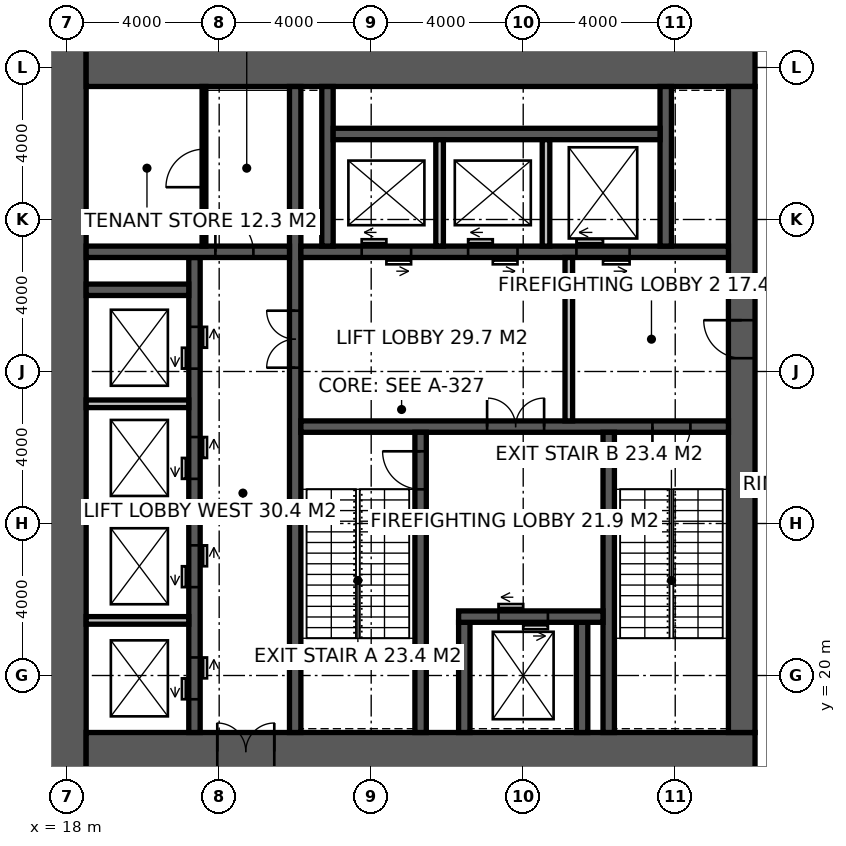
"""IFC4 building model, lengths in metres.
Left out: names, types, materials, properties, quantities, classifications, styles, units other than length and angle.
Written with IfcOpenShell. Run it as: python <this file> out.ifc"""

import sys

from ifc_helpers import new_model, si_unit, direction, frame, frame_2d, origin, place, context, subcontext, project, spatial, rectangle, extrude, element, fill, save


model = new_model("IFC4")
c1 = context("Model", 3, precision=1e-05, world=origin(), true_north=direction((0.0, 1.0)))
c2 = subcontext(c1, "Body", "Model", "MODEL_VIEW")
j1 = project(units=[si_unit("LENGTHUNIT", "METRE"), si_unit("PLANEANGLEUNIT", "RADIAN")], contexts=[c1])
p1 = place(None, origin())
s1 = spatial("IfcSite", under=j1, at=p1, CompositionType="ELEMENT")
p2 = place(p1, origin())
s2 = spatial("IfcBuilding", under=s1, at=p2, CompositionType="ELEMENT")
p3 = place(p2, frame((0.0, 0.0, 142.8)))
s3 = spatial("IfcBuildingStorey", under=s2, at=p3, CompositionType="ELEMENT", Elevation=142.8)
p4 = place(p3, frame((18.0, 17.5, -0.15), z_axis=(0.0, 0.0, 1.0), x_axis=(0.0, 1.0, 0.0)))
e1 = element("IfcWall", 1, at=p4, inside=s3, PredefinedType="SHEAR", context=c2, shape_type="SweptSolid", body=[
    extrude(rectangle(XDim=19.0, YDim=1.0, at=frame_2d((9.5, 0.0))), origin(), (0.0, 0.0, 1.0), 5.0),
])
p5 = place(p3, frame((18.5, 18.0, -0.15), z_axis=(0.0, 0.0, 1.0), x_axis=(1.0, 0.0, 0.0)))
e2 = element("IfcWall", 2, at=p5, inside=s3, PredefinedType="SHEAR", context=c2, shape_type="SweptSolid", body=[
    extrude(rectangle(XDim=17.6, YDim=1.0, at=frame_2d((8.8, 0.0))), origin(), (0.0, 0.0, 1.0), 5.0),
])
p6 = place(p5, frame((3.45, 0.0, 0.15)))
e3 = element("IfcOpeningElement", 3, at=p6, cuts=e2, PredefinedType="OPENING", context=c2, shape_type="SweptSolid", body=[
    extrude(rectangle(XDim=1.5, YDim=2.4, at=frame_2d((0.75, 1.2))), frame((0.0, 0.51, 0.0), z_axis=(0.0, -1.0, 0.0), x_axis=(1.0, 0.0, 0.0)), (0.0, 0.0, 1.0), 1.02),
])
p7 = place(p3, frame((18.5, 36.0, -0.15), z_axis=(0.0, 0.0, 1.0), x_axis=(1.0, 0.0, 0.0)))
e4 = element("IfcWall", 4, at=p7, inside=s3, PredefinedType="SHEAR", context=c2, shape_type="SweptSolid", body=[
    extrude(rectangle(XDim=17.6, YDim=1.0, at=frame_2d((8.8, 0.0))), origin(), (0.0, 0.0, 1.0), 5.0),
])
p8 = place(p3, frame((35.75, 18.5, -0.15), z_axis=(0.0, 0.0, 1.0), x_axis=(0.0, 1.0, 0.0)))
e5 = element("IfcWall", 5, at=p8, inside=s3, PredefinedType="SHEAR", context=c2, shape_type="SweptSolid", body=[
    extrude(rectangle(XDim=17.0, YDim=0.7, at=frame_2d((8.5, 0.0))), origin(), (0.0, 0.0, 1.0), 5.0),
])
p9 = place(p8, frame((9.85, 0.0, 0.15)))
e6 = element("IfcOpeningElement", 6, at=p9, cuts=e5, PredefinedType="OPENING", context=c2, shape_type="SweptSolid", body=[
    extrude(rectangle(XDim=1.0, YDim=2.2, at=frame_2d((0.5, 1.1))), frame((0.0, 0.36, 0.0), z_axis=(0.0, -1.0, 0.0), x_axis=(1.0, 0.0, 0.0)), (0.0, 0.0, 1.0), 0.72),
])
p10 = place(p3, frame((24.0, 18.5, -0.15), z_axis=(0.0, 0.0, 1.0), x_axis=(0.0, 1.0, 0.0)))
e7 = element("IfcWall", 7, at=p10, inside=s3, PredefinedType="SHEAR", context=c2, shape_type="SweptSolid", body=[
    extrude(rectangle(XDim=17.0, YDim=0.3, at=frame_2d((8.5, 0.0))), origin(), (0.0, 0.0, 1.0), 5.0),
])
p11 = place(p10, frame((9.6, 0.0, 0.15)))
e8 = element("IfcOpeningElement", 8, at=p11, cuts=e7, PredefinedType="OPENING", context=c2, shape_type="SweptSolid", body=[
    extrude(rectangle(XDim=1.5, YDim=2.4, at=frame_2d((0.75, 1.2))), frame((0.0, 0.16, 0.0), z_axis=(0.0, -1.0, 0.0), x_axis=(1.0, 0.0, 0.0)), (0.0, 0.0, 1.0), 0.32),
])
p12 = place(p3, frame((24.15, 26.55, -0.15), z_axis=(0.0, 0.0, 1.0), x_axis=(1.0, 0.0, 0.0)))
e9 = element("IfcWall", 9, at=p12, inside=s3, PredefinedType="SHEAR", context=c2, shape_type="SweptSolid", body=[
    extrude(rectangle(XDim=11.25, YDim=0.3, at=frame_2d((5.625, 0.0))), origin(), (0.0, 0.0, 1.0), 5.0),
])
p13 = place(p12, frame((9.25, 0.0, 0.15)))
e10 = element("IfcOpeningElement", 10, at=p13, cuts=e9, PredefinedType="OPENING", context=c2, shape_type="SweptSolid", body=[
    extrude(rectangle(XDim=1.0, YDim=2.2, at=frame_2d((0.5, 1.1))), frame((0.0, 0.16, 0.0), z_axis=(0.0, -1.0, 0.0), x_axis=(1.0, 0.0, 0.0)), (0.0, 0.0, 1.0), 0.32),
])
p14 = place(p12, frame((4.9, 0.0, 0.15)))
e11 = element("IfcOpeningElement", 11, at=p14, cuts=e9, PredefinedType="OPENING", context=c2, shape_type="SweptSolid", body=[
    extrude(rectangle(XDim=1.5, YDim=2.4, at=frame_2d((0.75, 1.2))), frame((0.0, 0.16, 0.0), z_axis=(0.0, -1.0, 0.0), x_axis=(1.0, 0.0, 0.0)), (0.0, 0.0, 1.0), 0.32),
])
p15 = place(p3, frame((27.3, 18.5, -0.15), z_axis=(0.0, 0.0, 1.0), x_axis=(0.0, 1.0, 0.0)))
e12 = element("IfcWall", 12, at=p15, inside=s3, PredefinedType="SHEAR", context=c2, shape_type="SweptSolid", body=[
    extrude(rectangle(XDim=7.9, YDim=0.3, at=frame_2d((3.95, 0.0))), origin(), (0.0, 0.0, 1.0), 5.0),
])
p16 = place(p15, frame((6.4, 0.0, 0.15)))
e13 = element("IfcOpeningElement", 13, at=p16, cuts=e12, PredefinedType="OPENING", context=c2, shape_type="SweptSolid", body=[
    extrude(rectangle(XDim=1.0, YDim=2.2, at=frame_2d((0.5, 1.1))), frame((0.0, 0.16, 0.0), z_axis=(0.0, -1.0, 0.0), x_axis=(1.0, 0.0, 0.0)), (0.0, 0.0, 1.0), 0.32),
])
p17 = place(p3, frame((32.25, 18.5, -0.15), z_axis=(0.0, 0.0, 1.0), x_axis=(0.0, 1.0, 0.0)))
e14 = element("IfcWall", 14, at=p17, inside=s3, PredefinedType="SHEAR", context=c2, shape_type="SweptSolid", body=[
    extrude(rectangle(XDim=7.9, YDim=0.3, at=frame_2d((3.95, 0.0))), origin(), (0.0, 0.0, 1.0), 5.0),
])
for number, where, z_axis, x_axis in (
    (15, (28.45, 18.5, -0.15), (0.0, 0.0, 1.0), (0.0, 1.0, 0.0)),
    (16, (31.55, 18.5, -0.15), (0.0, 0.0, 1.0), (0.0, 1.0, 0.0)),
):
    element("IfcWall", number, at=place(p3, frame(where, z_axis=z_axis, x_axis=x_axis)), inside=s3, PredefinedType="SHEAR", context=c2, shape_type="SweptSolid", body=[
        extrude(rectangle(XDim=2.9, YDim=0.3, at=frame_2d((1.45, 0.0))), origin(), (0.0, 0.0, 1.0), 5.0),
    ])
p18 = place(p3, frame((28.3, 21.55, -0.15), z_axis=(0.0, 0.0, 1.0), x_axis=(1.0, 0.0, 0.0)))
e17 = element("IfcWall", 17, at=p18, inside=s3, PredefinedType="SHEAR", context=c2, shape_type="SweptSolid", body=[
    extrude(rectangle(XDim=3.8, YDim=0.3, at=frame_2d((1.9, 0.0))), origin(), (0.0, 0.0, 1.0), 5.0),
])
p19 = place(p18, frame((1.05, 0.0, 0.15)))
e18 = element("IfcOpeningElement", 18, at=p19, cuts=e17, PredefinedType="OPENING", context=c2, shape_type="SweptSolid", body=[
    extrude(rectangle(XDim=1.3, YDim=2.4, at=frame_2d((0.65, 1.2))), frame((0.0, 0.16, 0.0), z_axis=(0.0, -1.0, 0.0), x_axis=(1.0, 0.0, 0.0)), (0.0, 0.0, 1.0), 0.32),
])
p20 = place(p3, frame((24.15, 31.15, -0.15), z_axis=(0.0, 0.0, 1.0), x_axis=(1.0, 0.0, 0.0)))
e19 = element("IfcWall", 19, at=p20, inside=s3, PredefinedType="SHEAR", context=c2, shape_type="SweptSolid", body=[
    extrude(rectangle(XDim=11.25, YDim=0.3, at=frame_2d((5.625, 0.0))), origin(), (0.0, 0.0, 1.0), 5.0),
])
p21 = place(p20, frame((1.6, 0.0, 0.15)))
e20 = element("IfcOpeningElement", 20, at=p21, cuts=e19, PredefinedType="OPENING", context=c2, shape_type="SweptSolid", body=[
    extrude(rectangle(XDim=1.3, YDim=2.4, at=frame_2d((0.65, 1.2))), frame((0.0, 0.16, 0.0), z_axis=(0.0, -1.0, 0.0), x_axis=(1.0, 0.0, 0.0)), (0.0, 0.0, 1.0), 0.32),
])
p22 = place(p20, frame((4.4, 0.0, 0.15)))
e21 = element("IfcOpeningElement", 21, at=p22, cuts=e19, PredefinedType="OPENING", context=c2, shape_type="SweptSolid", body=[
    extrude(rectangle(XDim=1.3, YDim=2.4, at=frame_2d((0.65, 1.2))), frame((0.0, 0.16, 0.0), z_axis=(0.0, -1.0, 0.0), x_axis=(1.0, 0.0, 0.0)), (0.0, 0.0, 1.0), 0.32),
])
p23 = place(p20, frame((7.25, 0.0, 0.15)))
e22 = element("IfcOpeningElement", 22, at=p23, cuts=e19, PredefinedType="OPENING", context=c2, shape_type="SweptSolid", body=[
    extrude(rectangle(XDim=1.4, YDim=2.4, at=frame_2d((0.7, 1.2))), frame((0.0, 0.16, 0.0), z_axis=(0.0, -1.0, 0.0), x_axis=(1.0, 0.0, 0.0)), (0.0, 0.0, 1.0), 0.32),
])
p24 = place(p3, frame((21.35, 18.5, -0.15), z_axis=(0.0, 0.0, 1.0), x_axis=(0.0, 1.0, 0.0)))
e23 = element("IfcWall", 23, at=p24, inside=s3, PredefinedType="SHEAR", context=c2, shape_type="SweptSolid", body=[
    extrude(rectangle(XDim=12.5, YDim=0.3, at=frame_2d((6.25, 0.0))), origin(), (0.0, 0.0, 1.0), 5.0),
])
p25 = place(p24, frame((0.875, 0.0, 0.15)))
e24 = element("IfcOpeningElement", 24, at=p25, cuts=e23, PredefinedType="OPENING", context=c2, shape_type="SweptSolid", body=[
    extrude(rectangle(XDim=1.1, YDim=2.2, at=frame_2d((0.55, 1.1))), frame((0.0, 0.16, 0.0), z_axis=(0.0, -1.0, 0.0), x_axis=(1.0, 0.0, 0.0)), (0.0, 0.0, 1.0), 0.32),
])
p26 = place(p24, frame((3.825, 0.0, 0.15)))
e25 = element("IfcOpeningElement", 25, at=p26, cuts=e23, PredefinedType="OPENING", context=c2, shape_type="SweptSolid", body=[
    extrude(rectangle(XDim=1.1, YDim=2.2, at=frame_2d((0.55, 1.1))), frame((0.0, 0.16, 0.0), z_axis=(0.0, -1.0, 0.0), x_axis=(1.0, 0.0, 0.0)), (0.0, 0.0, 1.0), 0.32),
])
p27 = place(p24, frame((6.675, 0.0, 0.15)))
e26 = element("IfcOpeningElement", 26, at=p27, cuts=e23, PredefinedType="OPENING", context=c2, shape_type="SweptSolid", body=[
    extrude(rectangle(XDim=1.1, YDim=2.2, at=frame_2d((0.55, 1.1))), frame((0.0, 0.16, 0.0), z_axis=(0.0, -1.0, 0.0), x_axis=(1.0, 0.0, 0.0)), (0.0, 0.0, 1.0), 0.32),
])
p28 = place(p24, frame((9.575, 0.0, 0.15)))
e27 = element("IfcOpeningElement", 27, at=p28, cuts=e23, PredefinedType="OPENING", context=c2, shape_type="SweptSolid", body=[
    extrude(rectangle(XDim=1.1, YDim=2.2, at=frame_2d((0.55, 1.1))), frame((0.0, 0.16, 0.0), z_axis=(0.0, -1.0, 0.0), x_axis=(1.0, 0.0, 0.0)), (0.0, 0.0, 1.0), 0.32),
])
p29 = place(p3, frame((18.5, 31.15, -0.15), z_axis=(0.0, 0.0, 1.0), x_axis=(1.0, 0.0, 0.0)))
e28 = element("IfcWall", 28, at=p29, inside=s3, PredefinedType="SHEAR", context=c2, shape_type="SweptSolid", body=[
    extrude(rectangle(XDim=5.35, YDim=0.3, at=frame_2d((2.675, 0.0))), origin(), (0.0, 0.0, 1.0), 5.0),
])
p30 = place(p29, frame((3.4, 0.0, 0.15)))
e29 = element("IfcOpeningElement", 29, at=p30, cuts=e28, PredefinedType="OPENING", context=c2, shape_type="SweptSolid", body=[
    extrude(rectangle(XDim=1.0, YDim=2.2, at=frame_2d((0.5, 1.1))), frame((0.0, 0.16, 0.0), z_axis=(0.0, -1.0, 0.0), x_axis=(1.0, 0.0, 0.0)), (0.0, 0.0, 1.0), 0.32),
])
p31 = place(p3, frame((18.5, 30.15, -0.15), z_axis=(0.0, 0.0, 1.0), x_axis=(1.0, 0.0, 0.0)))
e30 = element("IfcWall", 30, at=p31, inside=s3, PredefinedType="SHEAR", context=c2, shape_type="SweptSolid", body=[
    extrude(rectangle(XDim=2.7, YDim=0.3, at=frame_2d((1.35, 0.0))), origin(), (0.0, 0.0, 1.0), 5.0),
])
for number, where, z_axis, x_axis in (
    (31, (24.85, 31.3, -0.15), (0.0, 0.0, 1.0), (0.0, 1.0, 0.0)),
    (32, (33.75, 31.3, -0.15), (0.0, 0.0, 1.0), (0.0, 1.0, 0.0)),
):
    element("IfcWall", number, at=place(p3, frame(where, z_axis=z_axis, x_axis=x_axis)), inside=s3, PredefinedType="SHEAR", context=c2, shape_type="SweptSolid", body=[
        extrude(rectangle(XDim=4.2, YDim=0.3, at=frame_2d((2.1, 0.0))), origin(), (0.0, 0.0, 1.0), 5.0),
    ])
p32 = place(p3, frame((25.0, 34.25, -0.15), z_axis=(0.0, 0.0, 1.0), x_axis=(1.0, 0.0, 0.0)))
e33 = element("IfcWall", 33, at=p32, inside=s3, PredefinedType="SHEAR", context=c2, shape_type="SweptSolid", body=[
    extrude(rectangle(XDim=8.6, YDim=0.3, at=frame_2d((4.3, 0.0))), origin(), (0.0, 0.0, 1.0), 5.0),
])
for number, where, z_axis, x_axis in (
    (34, (27.8, 31.3, -0.15), (0.0, 0.0, 1.0), (0.0, 1.0, 0.0)),
    (35, (30.6, 31.3, -0.15), (0.0, 0.0, 1.0), (0.0, 1.0, 0.0)),
):
    element("IfcWall", number, at=place(p3, frame(where, z_axis=z_axis, x_axis=x_axis)), inside=s3, PredefinedType="SOLIDWALL", context=c2, shape_type="SweptSolid", body=[
        extrude(rectangle(XDim=2.8, YDim=0.2, at=frame_2d((1.4, 0.0))), origin(), (0.0, 0.0, 1.0), 5.0),
    ])
for number, where, z_axis, x_axis in (
    (36, (18.5, 21.45, -0.15), (0.0, 0.0, 1.0), (1.0, 0.0, 0.0)),
    (37, (18.5, 24.3, -0.15), (0.0, 0.0, 1.0), (1.0, 0.0, 0.0)),
    (38, (18.5, 27.15, -0.15), (0.0, 0.0, 1.0), (1.0, 0.0, 0.0)),
):
    element("IfcWall", number, at=place(p3, frame(where, z_axis=z_axis, x_axis=x_axis)), inside=s3, PredefinedType="SOLIDWALL", context=c2, shape_type="SweptSolid", body=[
        extrude(rectangle(XDim=2.7, YDim=0.2, at=frame_2d((1.35, 0.0))), origin(), (0.0, 0.0, 1.0), 5.0),
    ])
p33 = place(p3, frame((31.2, 26.7, 0.0), z_axis=(0.0, 0.0, 1.0), x_axis=(0.0, 1.0, 0.0)))
e39 = element("IfcWall", 39, at=p33, inside=s3, PredefinedType="SOLIDWALL", context=c2, shape_type="SweptSolid", body=[
    extrude(rectangle(XDim=4.3, YDim=0.2, at=frame_2d((2.15, 0.0))), origin(), (0.0, 0.0, 1.0), 4.85),
])
p34 = place(p3, frame((21.6, 31.3, 0.0), z_axis=(0.0, 0.0, 1.0), x_axis=(0.0, 1.0, 0.0)))
e40 = element("IfcWall", 40, at=p34, inside=s3, PredefinedType="PARTITIONING", context=c2, shape_type="SweptSolid", body=[
    extrude(rectangle(XDim=4.2, YDim=0.1, at=frame_2d((2.1, 0.0))), origin(), (0.0, 0.0, 1.0), 4.85),
])
p35 = place(p34, frame((1.55, 0.0, 0.0)))
e41 = element("IfcOpeningElement", 41, at=p35, cuts=e40, PredefinedType="OPENING", context=c2, shape_type="SweptSolid", body=[
    extrude(rectangle(XDim=1.0, YDim=2.2, at=frame_2d((0.5, 1.1))), frame((0.0, 0.06, 0.0), z_axis=(0.0, -1.0, 0.0), x_axis=(1.0, 0.0, 0.0)), (0.0, 0.0, 1.0), 0.12),
])
p36 = place(p16, origin())
e42 = element("IfcDoor", 42, at=p36, inside=s3, OperationType="SINGLE_SWING_RIGHT", PredefinedType="DOOR", context=c2, shape_type="SweptSolid", body=[
    extrude(rectangle(XDim=1.0, YDim=2.2, at=frame_2d((0.5, 1.1))), frame((0.0, 0.025, 0.0), z_axis=(0.0, -1.0, 0.0), x_axis=(1.0, 0.0, 0.0)), (0.0, 0.0, 1.0), 0.05),
])
fill(e13, e42)
p37 = place(p13, frame((1.0, 0.0, 0.0), z_axis=(0.0, 0.0, 1.0), x_axis=(-1.0, 0.0, 0.0)))
e43 = element("IfcDoor", 43, at=p37, inside=s3, OperationType="SINGLE_SWING_RIGHT", PredefinedType="DOOR", context=c2, shape_type="SweptSolid", body=[
    extrude(rectangle(XDim=1.0, YDim=2.2, at=frame_2d((0.5, 1.1))), frame((0.0, 0.025, 0.0), z_axis=(0.0, -1.0, 0.0), x_axis=(1.0, 0.0, 0.0)), (0.0, 0.0, 1.0), 0.05),
])
fill(e10, e43)
p38 = place(p9, origin())
e44 = element("IfcDoor", 44, at=p38, inside=s3, OperationType="SINGLE_SWING_RIGHT", PredefinedType="DOOR", context=c2, shape_type="SweptSolid", body=[
    extrude(rectangle(XDim=1.0, YDim=2.2, at=frame_2d((0.5, 1.1))), frame((0.0, 0.025, 0.0), z_axis=(0.0, -1.0, 0.0), x_axis=(1.0, 0.0, 0.0)), (0.0, 0.0, 1.0), 0.05),
])
fill(e6, e44)
p39 = place(p14, origin())
e45 = element("IfcDoor", 45, at=p39, inside=s3, OperationType="DOUBLE_DOOR_DOUBLE_SWING", PredefinedType="DOOR", context=c2, shape_type="SweptSolid", body=[
    extrude(rectangle(XDim=1.5, YDim=2.4, at=frame_2d((0.75, 1.2))), frame((0.0, 0.025, 0.0), z_axis=(0.0, -1.0, 0.0), x_axis=(1.0, 0.0, 0.0)), (0.0, 0.0, 1.0), 0.05),
])
fill(e11, e45)
p40 = place(p11, origin())
e46 = element("IfcDoor", 46, at=p40, inside=s3, OperationType="DOUBLE_DOOR_DOUBLE_SWING", PredefinedType="DOOR", context=c2, shape_type="SweptSolid", body=[
    extrude(rectangle(XDim=1.5, YDim=2.4, at=frame_2d((0.75, 1.2))), frame((0.0, 0.025, 0.0), z_axis=(0.0, -1.0, 0.0), x_axis=(1.0, 0.0, 0.0)), (0.0, 0.0, 1.0), 0.05),
])
fill(e8, e46)
p41 = place(p30, origin())
e47 = element("IfcDoor", 47, at=p41, inside=s3, OperationType="SINGLE_SWING_LEFT", PredefinedType="DOOR", context=c2, shape_type="SweptSolid", body=[
    extrude(rectangle(XDim=1.0, YDim=2.2, at=frame_2d((0.5, 1.1))), frame((0.0, 0.025, 0.0), z_axis=(0.0, -1.0, 0.0), x_axis=(1.0, 0.0, 0.0)), (0.0, 0.0, 1.0), 0.05),
])
fill(e29, e47)
p42 = place(p35, origin())
e48 = element("IfcDoor", 48, at=p42, inside=s3, OperationType="SINGLE_SWING_LEFT", PredefinedType="DOOR", context=c2, shape_type="SweptSolid", body=[
    extrude(rectangle(XDim=1.0, YDim=2.2, at=frame_2d((0.5, 1.1))), frame((0.0, 0.025, 0.0), z_axis=(0.0, -1.0, 0.0), x_axis=(1.0, 0.0, 0.0)), (0.0, 0.0, 1.0), 0.05),
])
fill(e41, e48)
p43 = place(p6, origin())
e49 = element("IfcDoor", 49, at=p43, inside=s3, OperationType="DOUBLE_DOOR_DOUBLE_SWING", PredefinedType="DOOR", context=c2, shape_type="SweptSolid", body=[
    extrude(rectangle(XDim=1.5, YDim=2.4, at=frame_2d((0.75, 1.2))), frame((0.0, 0.025, 0.0), z_axis=(0.0, -1.0, 0.0), x_axis=(1.0, 0.0, 0.0)), (0.0, 0.0, 1.0), 0.05),
])
fill(e3, e49)
p44 = place(p19, origin())
e50 = element("IfcDoor", 50, at=p44, inside=s3, OperationType="DOUBLE_DOOR_SLIDING", PredefinedType="DOOR", context=c2, shape_type="SweptSolid", body=[
    extrude(rectangle(XDim=1.3, YDim=2.4, at=frame_2d((0.65, 1.2))), frame((0.0, 0.025, 0.0), z_axis=(0.0, -1.0, 0.0), x_axis=(1.0, 0.0, 0.0)), (0.0, 0.0, 1.0), 0.05),
])
fill(e18, e50)
p45 = place(p21, origin())
e51 = element("IfcDoor", 51, at=p45, inside=s3, OperationType="DOUBLE_DOOR_SLIDING", PredefinedType="DOOR", context=c2, shape_type="SweptSolid", body=[
    extrude(rectangle(XDim=1.3, YDim=2.4, at=frame_2d((0.65, 1.2))), frame((0.0, 0.025, 0.0), z_axis=(0.0, -1.0, 0.0), x_axis=(1.0, 0.0, 0.0)), (0.0, 0.0, 1.0), 0.05),
])
fill(e20, e51)
p46 = place(p22, origin())
e52 = element("IfcDoor", 52, at=p46, inside=s3, OperationType="DOUBLE_DOOR_SLIDING", PredefinedType="DOOR", context=c2, shape_type="SweptSolid", body=[
    extrude(rectangle(XDim=1.3, YDim=2.4, at=frame_2d((0.65, 1.2))), frame((0.0, 0.025, 0.0), z_axis=(0.0, -1.0, 0.0), x_axis=(1.0, 0.0, 0.0)), (0.0, 0.0, 1.0), 0.05),
])
fill(e21, e52)
p47 = place(p23, origin())
e53 = element("IfcDoor", 53, at=p47, inside=s3, OperationType="DOUBLE_DOOR_SLIDING", PredefinedType="DOOR", context=c2, shape_type="SweptSolid", body=[
    extrude(rectangle(XDim=1.4, YDim=2.4, at=frame_2d((0.7, 1.2))), frame((0.0, 0.025, 0.0), z_axis=(0.0, -1.0, 0.0), x_axis=(1.0, 0.0, 0.0)), (0.0, 0.0, 1.0), 0.05),
])
fill(e22, e53)
p48 = place(p25, origin())
e54 = element("IfcDoor", 54, at=p48, inside=s3, OperationType="DOUBLE_DOOR_SLIDING", PredefinedType="DOOR", context=c2, shape_type="SweptSolid", body=[
    extrude(rectangle(XDim=1.1, YDim=2.2, at=frame_2d((0.55, 1.1))), frame((0.0, 0.025, 0.0), z_axis=(0.0, -1.0, 0.0), x_axis=(1.0, 0.0, 0.0)), (0.0, 0.0, 1.0), 0.05),
])
fill(e24, e54)
p49 = place(p26, origin())
e55 = element("IfcDoor", 55, at=p49, inside=s3, OperationType="DOUBLE_DOOR_SLIDING", PredefinedType="DOOR", context=c2, shape_type="SweptSolid", body=[
    extrude(rectangle(XDim=1.1, YDim=2.2, at=frame_2d((0.55, 1.1))), frame((0.0, 0.025, 0.0), z_axis=(0.0, -1.0, 0.0), x_axis=(1.0, 0.0, 0.0)), (0.0, 0.0, 1.0), 0.05),
])
fill(e25, e55)
p50 = place(p27, origin())
e56 = element("IfcDoor", 56, at=p50, inside=s3, OperationType="DOUBLE_DOOR_SLIDING", PredefinedType="DOOR", context=c2, shape_type="SweptSolid", body=[
    extrude(rectangle(XDim=1.1, YDim=2.2, at=frame_2d((0.55, 1.1))), frame((0.0, 0.025, 0.0), z_axis=(0.0, -1.0, 0.0), x_axis=(1.0, 0.0, 0.0)), (0.0, 0.0, 1.0), 0.05),
])
fill(e26, e56)
p51 = place(p28, origin())
e57 = element("IfcDoor", 57, at=p51, inside=s3, OperationType="DOUBLE_DOOR_SLIDING", PredefinedType="DOOR", context=c2, shape_type="SweptSolid", body=[
    extrude(rectangle(XDim=1.1, YDim=2.2, at=frame_2d((0.55, 1.1))), frame((0.0, 0.025, 0.0), z_axis=(0.0, -1.0, 0.0), x_axis=(1.0, 0.0, 0.0)), (0.0, 0.0, 1.0), 0.05),
])
fill(e27, e57)
save(model, sys.argv[1])
